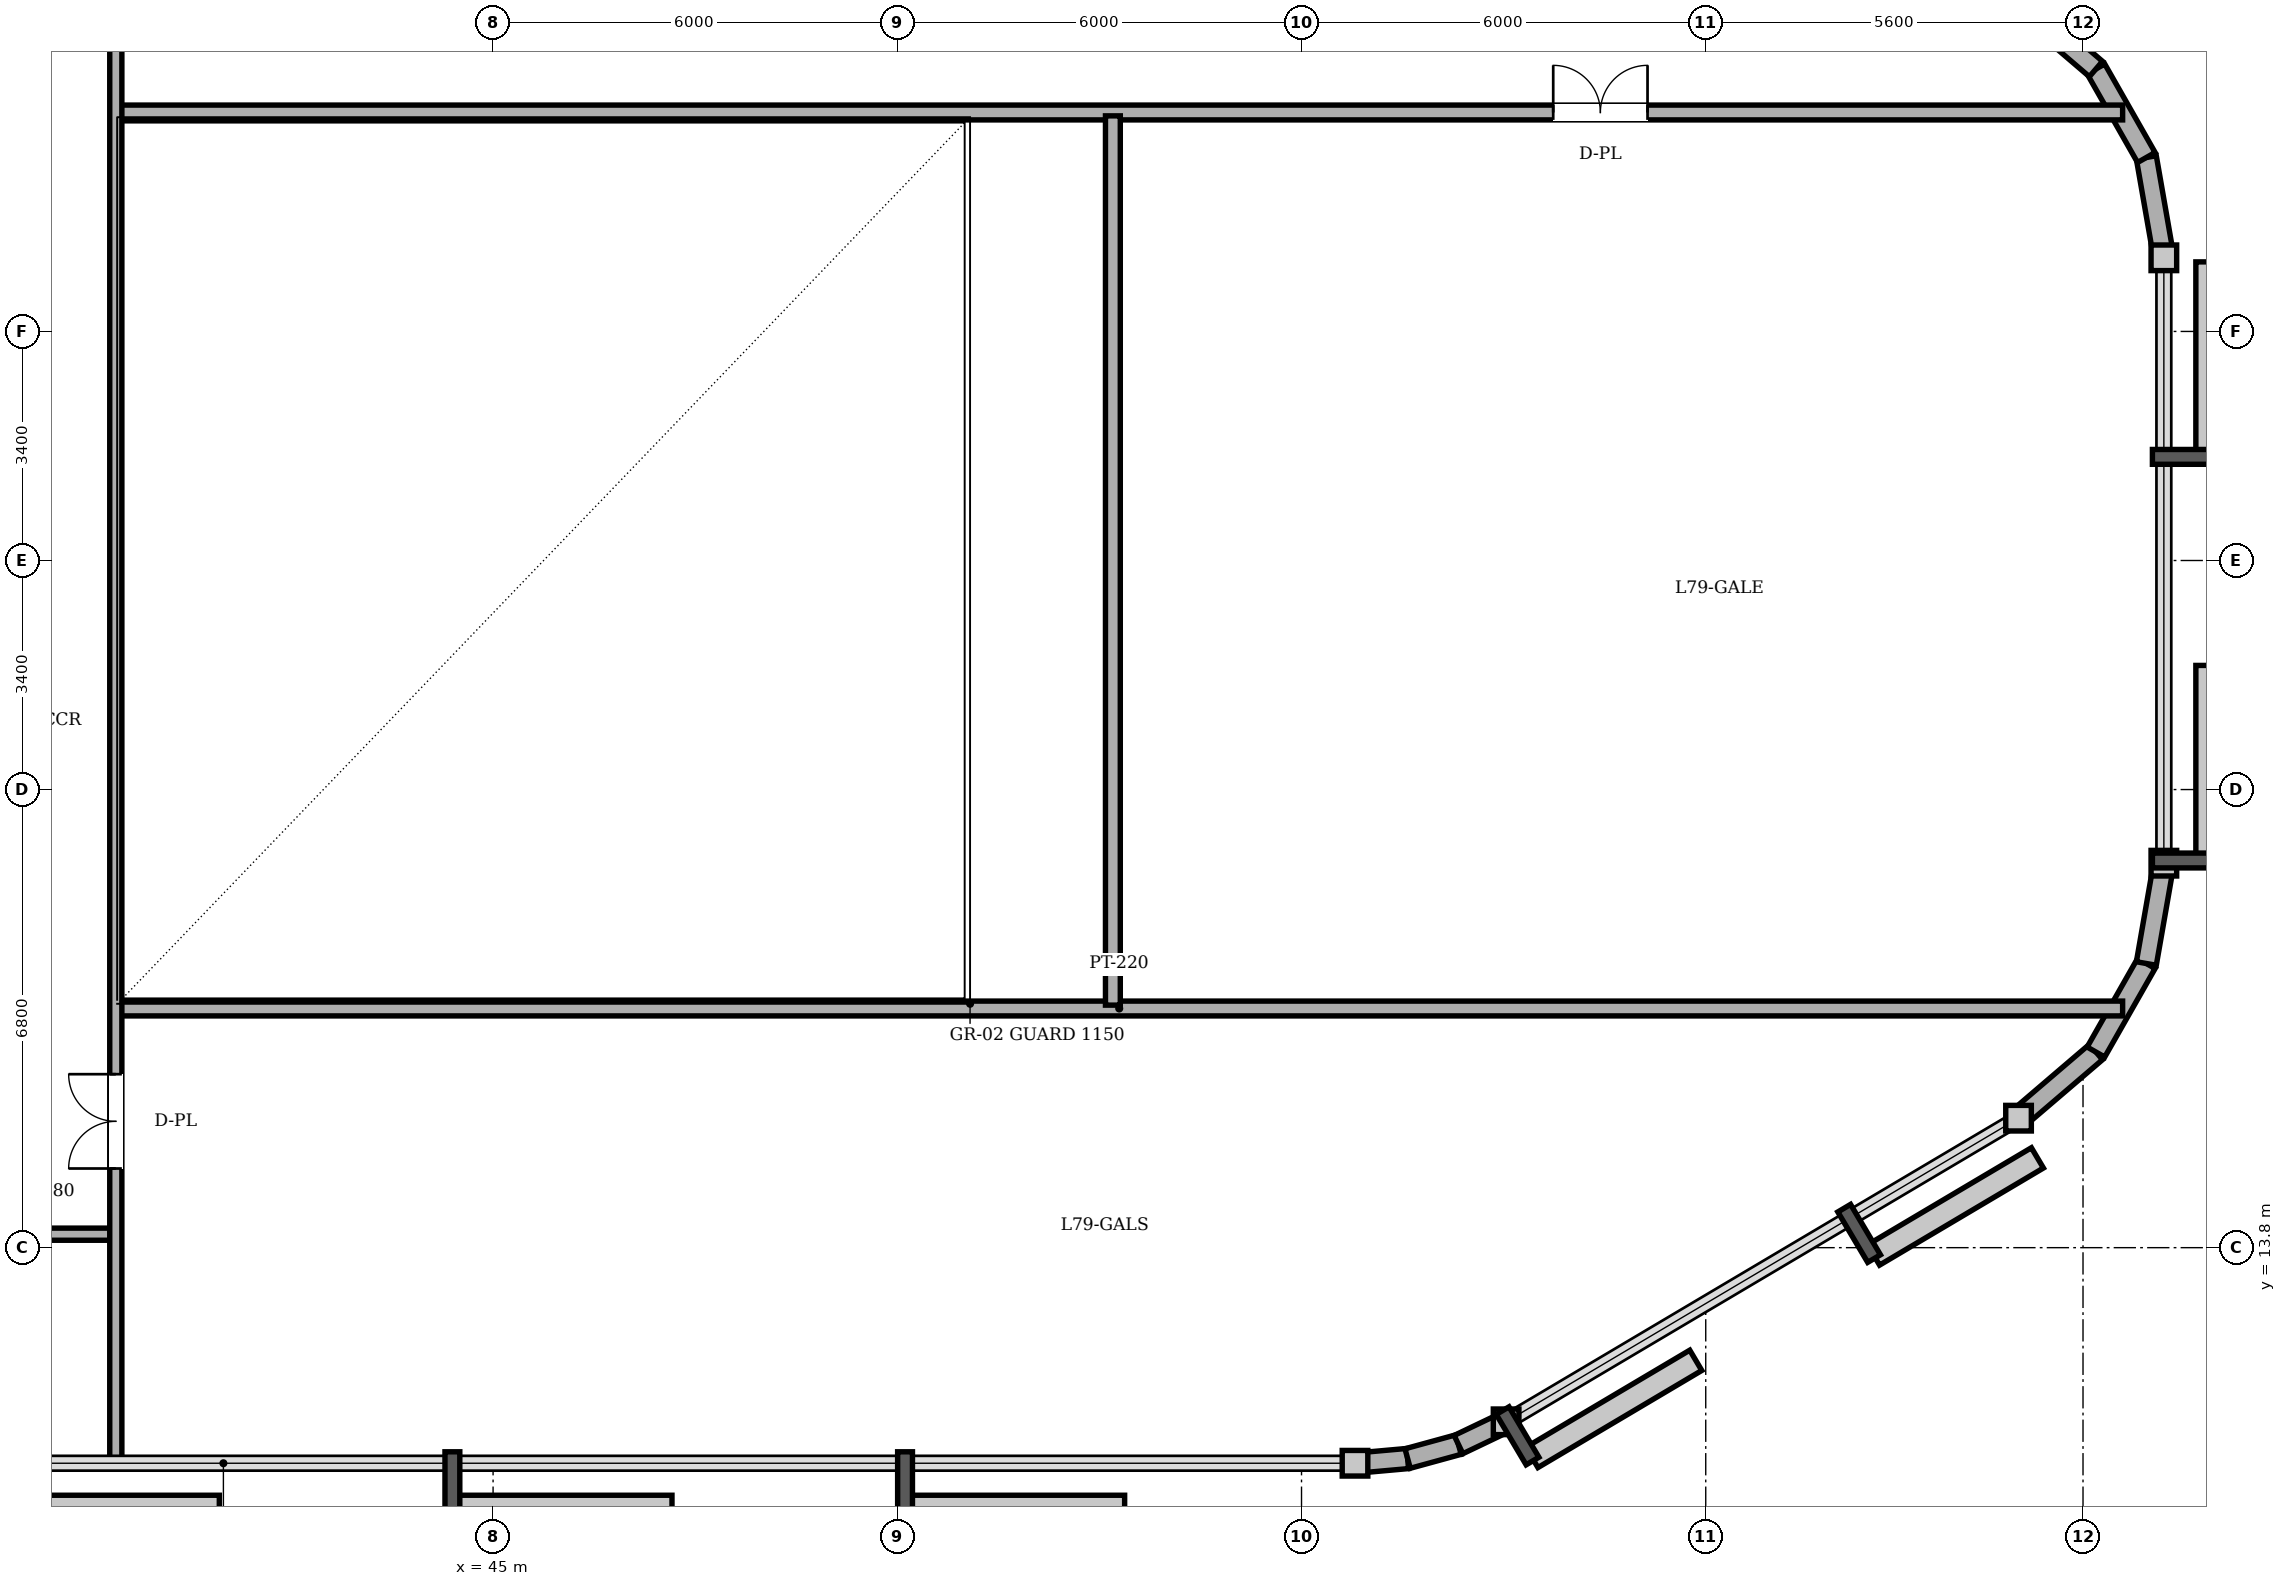
"""IFC4 building model, lengths in metres.
Left out: names, types, materials, properties, quantities, classifications, styles, units other than length and angle.
Written with IfcOpenShell. Run it as: python <this file> out.ifc"""

import sys

from ifc_helpers import new_model, si_unit, direction, frame, frame_2d, origin, place, context, subcontext, project, spatial, rectangle, extrude, element, fill, save


model = new_model("IFC4")
c1 = context("Model", 3, precision=1e-05, world=origin(), true_north=direction((0.0, 1.0)))
c2 = subcontext(c1, "Body", "Model", "MODEL_VIEW")
j1 = project(units=[si_unit("LENGTHUNIT", "METRE"), si_unit("PLANEANGLEUNIT", "RADIAN")], contexts=[c1])
p1 = place(None, origin())
s1 = spatial("IfcSite", under=j1, at=p1, CompositionType="ELEMENT")
p2 = place(p1, origin())
s2 = spatial("IfcBuilding", under=s1, at=p2, CompositionType="ELEMENT")
p3 = place(p2, frame((0.0, 0.0, 308.0)))
s3 = spatial("IfcBuildingStorey", under=s2, at=p3, CompositionType="ELEMENT", Elevation=308.0)
p4 = place(p3, frame((57.794, 10.6, 0.0), z_axis=(0.0, 0.0, 1.0), x_axis=(0.996027356167, 0.089047772386, 0.0)))
e1 = element("IfcWall", 1, at=p4, inside=s3, PredefinedType="SOLIDWALL", context=c2, shape_type="SweptSolid", body=[
    extrude(rectangle(XDim=0.784, YDim=0.3, at=frame_2d((0.392, 0.0))), origin(), (0.0, 0.0, 1.0), 7.2),
])
p5 = place(p3, frame((58.575, 10.67, 0.0), z_axis=(0.0, 0.0, 1.0), x_axis=(0.964410376476, 0.264409957728, 0.0)))
e2 = element("IfcWall", 2, at=p5, inside=s3, PredefinedType="SOLIDWALL", context=c2, shape_type="SweptSolid", body=[
    extrude(rectangle(XDim=0.783, YDim=0.3, at=frame_2d((0.392, 0.0))), origin(), (0.0, 0.0, 1.0), 7.2),
])
p6 = place(p3, frame((59.33, 10.877, 0.0), z_axis=(0.0, 0.0, 1.0), x_axis=(0.902139493314, 0.43144447453, 0.0)))
e3 = element("IfcWall", 3, at=p6, inside=s3, PredefinedType="SOLIDWALL", context=c2, shape_type="SweptSolid", body=[
    extrude(rectangle(XDim=0.784, YDim=0.3, at=frame_2d((0.392, 0.0))), origin(), (0.0, 0.0, 1.0), 7.2),
])
p7 = place(p3, frame((67.643, 15.722, 0.0), z_axis=(0.0, 0.0, 1.0), x_axis=(0.76011105051, 0.649793190863, 0.0)))
e4 = element("IfcWall", 4, at=p7, inside=s3, PredefinedType="SOLIDWALL", context=c2, shape_type="SweptSolid", body=[
    extrude(rectangle(XDim=1.511, YDim=0.3, at=frame_2d((0.756, 0.0))), origin(), (0.0, 0.0, 1.0), 7.2),
])
p8 = place(p3, frame((68.792, 16.704, 0.0), z_axis=(0.0, 0.0, 1.0), x_axis=(0.494747166685, 0.869036961847, 0.0)))
e5 = element("IfcWall", 5, at=p8, inside=s3, PredefinedType="SOLIDWALL", context=c2, shape_type="SweptSolid", body=[
    extrude(rectangle(XDim=1.512, YDim=0.3, at=frame_2d((0.756, 0.0))), origin(), (0.0, 0.0, 1.0), 7.2),
])
for number, where, z_axis, x_axis in (
    (6, (69.54, 18.018, 0.0), (0.0, 0.0, 1.0), (0.172, 0.985, 0.0)),
    (7, (69.8, 28.493, 0.0), (0.0, 0.0, 1.0), (-0.172, 0.985, 0.0)),
):
    element("IfcWall", number, at=place(p3, frame(where, z_axis=z_axis, x_axis=x_axis)), inside=s3, PredefinedType="SOLIDWALL", context=c2, shape_type="SweptSolid", body=[
        extrude(rectangle(XDim=1.511, YDim=0.3, at=frame_2d((0.756, 0.0))), origin(), (0.0, 0.0, 1.0), 7.2),
    ])
p9 = place(p3, frame((69.54, 29.982, 0.0), z_axis=(0.0, 0.0, 1.0), x_axis=(-0.494747166685, 0.869036961847, 0.0)))
e8 = element("IfcWall", 8, at=p9, inside=s3, PredefinedType="SOLIDWALL", context=c2, shape_type="SweptSolid", body=[
    extrude(rectangle(XDim=1.512, YDim=0.3, at=frame_2d((0.756, 0.0))), origin(), (0.0, 0.0, 1.0), 7.2),
])
p10 = place(p3, frame((68.792, 31.296, 0.0), z_axis=(0.0, 0.0, 1.0), x_axis=(-0.76011105051, 0.649793190863, 0.0)))
e9 = element("IfcWall", 9, at=p10, inside=s3, PredefinedType="SOLIDWALL", context=c2, shape_type="SweptSolid", body=[
    extrude(rectangle(XDim=1.511, YDim=0.3, at=frame_2d((0.756, 0.0))), origin(), (0.0, 0.0, 1.0), 7.2),
])
p11 = place(p3, frame((37.3, 14.0, 0.0), z_axis=(0.0, 0.0, 1.0), x_axis=(1.0, 0.0, 0.0)))
e10 = element("IfcWall", 10, at=p11, inside=s3, PredefinedType="PARTITIONING", context=c2, shape_type="SweptSolid", body=[
    extrude(rectangle(XDim=2.1, YDim=0.18, at=frame_2d((1.05, 0.0))), origin(), (0.0, 0.0, 1.0), 6.95),
])
p12 = place(p3, frame((39.4, 17.35, 0.0), z_axis=(0.0, 0.0, 1.0), x_axis=(1.0, 0.0, 0.0)))
e11 = element("IfcWall", 11, at=p12, inside=s3, PredefinedType="PARTITIONING", context=c2, shape_type="SweptSolid", body=[
    extrude(rectangle(XDim=29.788, YDim=0.22, at=frame_2d((14.894, 0.0))), origin(), (0.0, 0.0, 1.0), 6.432),
])
p13 = place(p3, frame((39.4, 30.65, 0.0), z_axis=(0.0, 0.0, 1.0), x_axis=(1.0, 0.0, 0.0)))
e12 = element("IfcWall", 12, at=p13, inside=s3, PredefinedType="PARTITIONING", context=c2, shape_type="SweptSolid", body=[
    extrude(rectangle(XDim=29.788, YDim=0.22, at=frame_2d((14.894, 0.0))), origin(), (0.0, 0.0, 1.0), 6.432),
])
p14 = place(p13, frame((21.336, 0.0, 0.0)))
e13 = element("IfcOpeningElement", 13, at=p14, cuts=e12, PredefinedType="OPENING", context=c2, shape_type="SweptSolid", body=[
    extrude(rectangle(XDim=1.4, YDim=2.25, at=frame_2d((0.7, 1.125))), frame((0.0, 0.12, 0.0), z_axis=(0.0, -1.0, 0.0), x_axis=(1.0, 0.0, 0.0)), (0.0, 0.0, 1.0), 0.24),
])
p15 = place(p3, frame((39.4, 10.6, 0.0), z_axis=(0.0, 0.0, 1.0), x_axis=(0.0, 1.0, 0.0)))
e14 = element("IfcWall", 14, at=p15, inside=s3, PredefinedType="PARTITIONING", context=c2, shape_type="SweptSolid", body=[
    extrude(rectangle(XDim=26.8, YDim=0.18, at=frame_2d((13.4, 0.0))), origin(), (0.0, 0.0, 1.0), 6.95),
])
p16 = place(p15, frame((21.025, 0.0, 0.0)))
e15 = element("IfcOpeningElement", 15, at=p16, cuts=e14, PredefinedType="OPENING", context=c2, shape_type="SweptSolid", body=[
    extrude(rectangle(XDim=1.4, YDim=2.25, at=frame_2d((0.7, 1.125))), frame((0.0, 0.1, 0.0), z_axis=(0.0, -1.0, 0.0), x_axis=(1.0, 0.0, 0.0)), (0.0, 0.0, 1.0), 0.2),
])
p17 = place(p15, frame((4.375, 0.0, 0.0)))
e16 = element("IfcOpeningElement", 16, at=p17, cuts=e14, PredefinedType="OPENING", context=c2, shape_type="SweptSolid", body=[
    extrude(rectangle(XDim=1.4, YDim=2.25, at=frame_2d((0.7, 1.125))), frame((0.0, 0.1, 0.0), z_axis=(0.0, -1.0, 0.0), x_axis=(1.0, 0.0, 0.0)), (0.0, 0.0, 1.0), 0.2),
])
p18 = place(p3, frame((54.2, 17.4, 0.0), z_axis=(0.0, 0.0, 1.0), x_axis=(0.0, 1.0, 0.0)))
e17 = element("IfcWall", 17, at=p18, inside=s3, PredefinedType="PARTITIONING", context=c2, shape_type="SweptSolid", body=[
    extrude(rectangle(XDim=13.2, YDim=0.22, at=frame_2d((6.6, 0.0))), origin(), (0.0, 0.0, 1.0), 6.95),
])
p19 = place(p17, origin())
e18 = element("IfcDoor", 18, at=p19, inside=s3, OperationType="DOUBLE_DOOR_SINGLE_SWING", PredefinedType="DOOR", context=c2, shape_type="SweptSolid", body=[
    extrude(rectangle(XDim=1.4, YDim=2.25, at=frame_2d((0.7, 1.125))), frame((0.0, 0.025, 0.0), z_axis=(0.0, -1.0, 0.0), x_axis=(1.0, 0.0, 0.0)), (0.0, 0.0, 1.0), 0.05),
])
fill(e16, e18)
p20 = place(p14, origin())
e19 = element("IfcDoor", 19, at=p20, inside=s3, OperationType="DOUBLE_DOOR_SINGLE_SWING", PredefinedType="DOOR", context=c2, shape_type="SweptSolid", body=[
    extrude(rectangle(XDim=1.4, YDim=2.25, at=frame_2d((0.7, 1.125))), frame((0.0, 0.025, 0.0), z_axis=(0.0, -1.0, 0.0), x_axis=(1.0, 0.0, 0.0)), (0.0, 0.0, 1.0), 0.05),
])
fill(e13, e19)
save(model, sys.argv[1])
